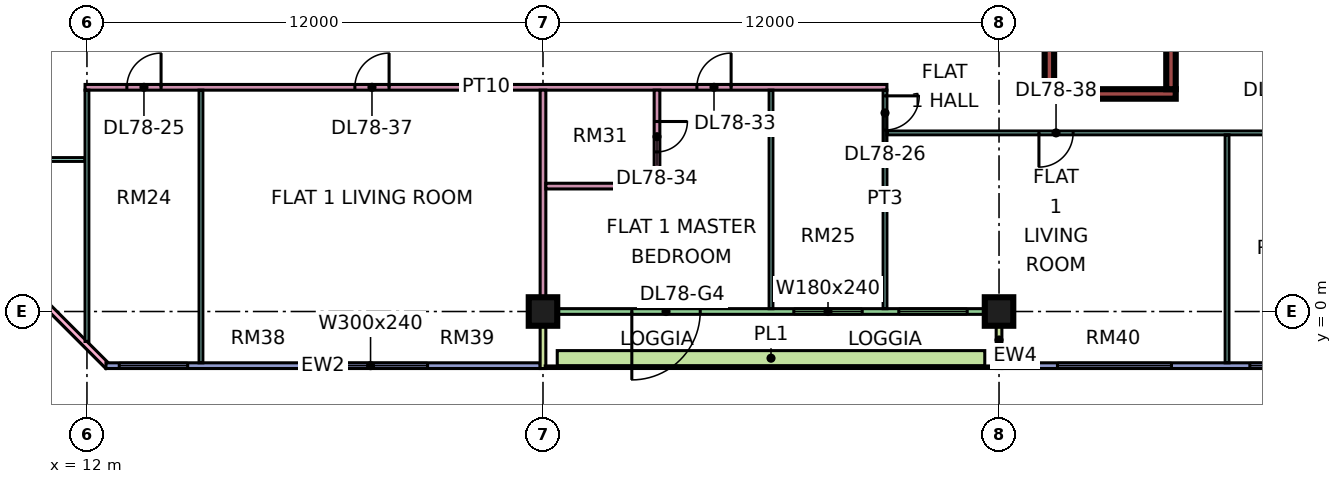
"""IFC4 building model, lengths in metres.
Left out: names, types, materials, properties, quantities, classifications, styles, units other than length and angle.
Written with IfcOpenShell. Run it as: python <this file> out.ifc"""

import sys

from ifc_helpers import new_model, si_unit, direction, frame, frame_2d, origin, origin_2d, place, context, subcontext, project, spatial, rectangle, extrude, element, fill, save


model = new_model("IFC4")
c1 = context("Model", 3, precision=1e-05, world=origin(), true_north=direction((0.0, 1.0)))
c2 = subcontext(c1, "Body", "Model", "MODEL_VIEW")
j1 = project(units=[si_unit("LENGTHUNIT", "METRE"), si_unit("PLANEANGLEUNIT", "RADIAN")], contexts=[c1])
p1 = place(None, origin())
s1 = spatial("IfcSite", under=j1, at=p1, CompositionType="ELEMENT")
p2 = place(p1, origin())
s2 = spatial("IfcBuilding", under=s1, at=p2, CompositionType="ELEMENT")
p3 = place(p2, frame((0.0, 0.0, 338.9)))
s3 = spatial("IfcBuildingStorey", under=s2, at=p3, CompositionType="ELEMENT", Elevation=338.9)
for number, where, z_axis, x_axis in (
    (1, (24.0, 0.0, 0.0), (0.0, 0.0, 1.0), (1.0, 0.0, 0.0)),
    (2, (36.0, 0.0, 0.0), (0.0, 0.0, 1.0), (1.0, 0.0, 0.0)),
):
    element("IfcColumn", number, at=place(p3, frame(where, z_axis=z_axis, x_axis=x_axis)), inside=s3, PredefinedType="COLUMN", context=c2, shape_type="SweptSolid", body=[
        extrude(rectangle(XDim=0.75, YDim=0.75, at=origin_2d()), origin(), (0.0, 0.0, 1.0), 3.75),
    ])
p4 = place(p3, frame((37.2, 5.725, 0.0), z_axis=(0.0, 0.0, 1.0), x_axis=(1.0, 0.0, 0.0)))
e3 = element("IfcWall", 3, at=p4, inside=s3, PredefinedType="SHEAR", context=c2, shape_type="SweptSolid", body=[
    extrude(rectangle(XDim=3.45, YDim=0.25, at=frame_2d((1.725, 0.0))), origin(), (0.0, 0.0, 1.0), 3.75),
])
for number, where, z_axis, x_axis in (
    (4, (37.325, 5.85, 0.0), (0.0, 0.0, 1.0), (0.0, 1.0, 0.0)),
    (5, (40.525, 5.85, 0.0), (0.0, 0.0, 1.0), (0.0, 1.0, 0.0)),
):
    element("IfcWall", number, at=place(p3, frame(where, z_axis=z_axis, x_axis=x_axis)), inside=s3, PredefinedType="SHEAR", context=c2, shape_type="SweptSolid", body=[
        extrude(rectangle(XDim=6.5, YDim=0.25, at=frame_2d((3.25, 0.0))), origin(), (0.0, 0.0, 1.0), 3.75),
    ])
p5 = place(p3, frame((-1.447, 12.553, 0.0), z_axis=(0.0, 0.0, 1.0), x_axis=(0.707106781187, -0.707106781187, 0.0)))
e6 = element("IfcWall", 6, at=p5, inside=s3, PredefinedType="SOLIDWALL", context=c2, shape_type="SweptSolid", body=[
    extrude(rectangle(XDim=19.799, YDim=0.15, at=frame_2d((9.899, 0.0))), origin(), (0.0, 0.0, 1.0), 3.35),
])
p6 = place(p5, frame((2.212, 0.0, 0.45)))
e7 = element("IfcOpeningElement", 7, at=p6, cuts=e6, PredefinedType="OPENING", context=c2, shape_type="SweptSolid", body=[
    extrude(rectangle(XDim=3.0, YDim=2.4, at=frame_2d((1.5, 1.2))), frame((0.0, 0.085, 0.0), z_axis=(0.0, -1.0, 0.0), x_axis=(1.0, 0.0, 0.0)), (0.0, 0.0, 1.0), 0.17),
])
p7 = place(p5, frame((10.216, 0.0, 0.45)))
e8 = element("IfcOpeningElement", 8, at=p7, cuts=e6, PredefinedType="OPENING", context=c2, shape_type="SweptSolid", body=[
    extrude(rectangle(XDim=3.0, YDim=2.4, at=frame_2d((1.5, 1.2))), frame((0.0, 0.085, 0.0), z_axis=(0.0, -1.0, 0.0), x_axis=(1.0, 0.0, 0.0)), (0.0, 0.0, 1.0), 0.17),
])
p8 = place(p3, frame((12.5, -1.425, 0.0), z_axis=(0.0, 0.0, 1.0), x_axis=(1.0, 0.0, 0.0)))
e9 = element("IfcWall", 9, at=p8, inside=s3, PredefinedType="SOLIDWALL", context=c2, shape_type="SweptSolid", body=[
    extrude(rectangle(XDim=11.425, YDim=0.15, at=frame_2d((5.712, 0.0))), origin(), (0.0, 0.0, 1.0), 3.35),
])
p9 = place(p8, frame((0.35, 0.0, 0.45)))
e10 = element("IfcOpeningElement", 10, at=p9, cuts=e9, PredefinedType="OPENING", context=c2, shape_type="SweptSolid", body=[
    extrude(rectangle(XDim=1.8, YDim=2.4, at=frame_2d((0.9, 1.2))), frame((0.0, 0.085, 0.0), z_axis=(0.0, -1.0, 0.0), x_axis=(1.0, 0.0, 0.0)), (0.0, 0.0, 1.0), 0.17),
])
p10 = place(p8, frame((5.462, 0.0, 0.45)))
e11 = element("IfcOpeningElement", 11, at=p10, cuts=e9, PredefinedType="OPENING", context=c2, shape_type="SweptSolid", body=[
    extrude(rectangle(XDim=3.0, YDim=2.4, at=frame_2d((1.5, 1.2))), frame((0.0, 0.085, 0.0), z_axis=(0.0, -1.0, 0.0), x_axis=(1.0, 0.0, 0.0)), (0.0, 0.0, 1.0), 0.17),
])
p11 = place(p3, frame((24.075, 0.0, 0.0), z_axis=(0.0, 0.0, 1.0), x_axis=(1.0, 0.0, 0.0)))
e12 = element("IfcWall", 12, at=p11, inside=s3, PredefinedType="SOLIDWALL", context=c2, shape_type="SweptSolid", body=[
    extrude(rectangle(XDim=11.85, YDim=0.15, at=frame_2d((5.925, 0.0))), origin(), (0.0, 0.0, 1.0), 3.35),
])
p12 = place(p11, frame((2.262, 0.0, 0.0)))
e13 = element("IfcOpeningElement", 13, at=p12, cuts=e12, PredefinedType="OPENING", context=c2, shape_type="SweptSolid", body=[
    extrude(rectangle(XDim=1.8, YDim=2.4, at=frame_2d((0.9, 1.2))), frame((0.0, 0.085, 0.0), z_axis=(0.0, -1.0, 0.0), x_axis=(1.0, 0.0, 0.0)), (0.0, 0.0, 1.0), 0.17),
])
p13 = place(p11, frame((6.525, 0.0, 0.45)))
e14 = element("IfcOpeningElement", 14, at=p13, cuts=e12, PredefinedType="OPENING", context=c2, shape_type="SweptSolid", body=[
    extrude(rectangle(XDim=1.8, YDim=2.4, at=frame_2d((0.9, 1.2))), frame((0.0, 0.085, 0.0), z_axis=(0.0, -1.0, 0.0), x_axis=(1.0, 0.0, 0.0)), (0.0, 0.0, 1.0), 0.17),
])
p14 = place(p11, frame((9.288, 0.0, 0.45)))
e15 = element("IfcOpeningElement", 15, at=p14, cuts=e12, PredefinedType="OPENING", context=c2, shape_type="SweptSolid", body=[
    extrude(rectangle(XDim=1.8, YDim=2.4, at=frame_2d((0.9, 1.2))), frame((0.0, 0.085, 0.0), z_axis=(0.0, -1.0, 0.0), x_axis=(1.0, 0.0, 0.0)), (0.0, 0.0, 1.0), 0.17),
])
for number, where, z_axis, x_axis in (
    (16, (24.0, -1.5, 0.0), (0.0, 0.0, 1.0), (0.0, 1.0, 0.0)),
    (17, (36.0, -1.5, 0.0), (0.0, 0.0, 1.0), (0.0, 1.0, 0.0)),
):
    element("IfcWall", number, at=place(p3, frame(where, z_axis=z_axis, x_axis=x_axis)), inside=s3, PredefinedType="SOLIDWALL", context=c2, shape_type="SweptSolid", body=[
        extrude(rectangle(XDim=1.5, YDim=0.15, at=frame_2d((0.75, 0.0))), origin(), (0.0, 0.0, 1.0), 3.35),
    ])
p15 = place(p3, frame((36.075, -1.425, 0.0), z_axis=(0.0, 0.0, 1.0), x_axis=(1.0, 0.0, 0.0)))
e18 = element("IfcWall", 18, at=p15, inside=s3, PredefinedType="SOLIDWALL", context=c2, shape_type="SweptSolid", body=[
    extrude(rectangle(XDim=11.85, YDim=0.15, at=frame_2d((5.925, 0.0))), origin(), (0.0, 0.0, 1.0), 3.35),
])
p16 = place(p15, frame((1.462, 0.0, 0.45)))
e19 = element("IfcOpeningElement", 19, at=p16, cuts=e18, PredefinedType="OPENING", context=c2, shape_type="SweptSolid", body=[
    extrude(rectangle(XDim=3.0, YDim=2.4, at=frame_2d((1.5, 1.2))), frame((0.0, 0.085, 0.0), z_axis=(0.0, -1.0, 0.0), x_axis=(1.0, 0.0, 0.0)), (0.0, 0.0, 1.0), 0.17),
])
p17 = place(p15, frame((6.525, 0.0, 0.45)))
e20 = element("IfcOpeningElement", 20, at=p17, cuts=e18, PredefinedType="OPENING", context=c2, shape_type="SweptSolid", body=[
    extrude(rectangle(XDim=1.8, YDim=2.4, at=frame_2d((0.9, 1.2))), frame((0.0, 0.085, 0.0), z_axis=(0.0, -1.0, 0.0), x_axis=(1.0, 0.0, 0.0)), (0.0, 0.0, 1.0), 0.17),
])
p18 = place(p15, frame((9.488, 0.0, 0.45)))
e21 = element("IfcOpeningElement", 21, at=p18, cuts=e18, PredefinedType="OPENING", context=c2, shape_type="SweptSolid", body=[
    extrude(rectangle(XDim=1.8, YDim=2.4, at=frame_2d((0.9, 1.2))), frame((0.0, 0.085, 0.0), z_axis=(0.0, -1.0, 0.0), x_axis=(1.0, 0.0, 0.0)), (0.0, 0.0, 1.0), 0.17),
])
p19 = place(p3, frame((24.375, -1.229, 0.0), z_axis=(0.0, 0.0, 1.0), x_axis=(1.0, 0.0, 0.0)))
e22 = element("IfcWall", 22, at=p19, inside=s3, PredefinedType="SOLIDWALL", context=c2, shape_type="SweptSolid", body=[
    extrude(rectangle(XDim=11.25, YDim=0.4, at=frame_2d((5.625, 0.0))), origin(), (0.0, 0.0, 1.0), 0.7),
])
p20 = place(p3, frame((9.05, 4.0, 0.0), z_axis=(0.0, 0.0, 1.0), x_axis=(1.0, 0.0, 0.0)))
e23 = element("IfcWall", 23, at=p20, inside=s3, PredefinedType="PARTITIONING", context=c2, shape_type="SweptSolid", body=[
    extrude(rectangle(XDim=2.9, YDim=0.1, at=frame_2d((1.45, 0.0))), origin(), (0.0, 0.0, 1.0), 3.35),
])
p21 = place(p3, frame((11.95, 5.9, 0.0), z_axis=(0.0, 0.0, 1.0), x_axis=(1.0, 0.0, 0.0)))
e24 = element("IfcWall", 24, at=p21, inside=s3, PredefinedType="PARTITIONING", context=c2, shape_type="SweptSolid", body=[
    extrude(rectangle(XDim=21.1, YDim=0.15, at=frame_2d((10.55, 0.0))), origin(), (0.0, 0.0, 1.0), 3.35),
])
p22 = place(p21, frame((1.1, 0.0, 0.0)))
e25 = element("IfcOpeningElement", 25, at=p22, cuts=e24, PredefinedType="OPENING", context=c2, shape_type="SweptSolid", body=[
    extrude(rectangle(XDim=0.9, YDim=2.1, at=frame_2d((0.45, 1.05))), frame((0.0, 0.085, 0.0), z_axis=(0.0, -1.0, 0.0), x_axis=(1.0, 0.0, 0.0)), (0.0, 0.0, 1.0), 0.17),
])
p23 = place(p21, frame((16.1, 0.0, 0.0)))
e26 = element("IfcOpeningElement", 26, at=p23, cuts=e24, PredefinedType="OPENING", context=c2, shape_type="SweptSolid", body=[
    extrude(rectangle(XDim=0.9, YDim=2.1, at=frame_2d((0.45, 1.05))), frame((0.0, 0.085, 0.0), z_axis=(0.0, -1.0, 0.0), x_axis=(1.0, 0.0, 0.0)), (0.0, 0.0, 1.0), 0.17),
])
p24 = place(p21, frame((7.1, 0.0, 0.0)))
e27 = element("IfcOpeningElement", 27, at=p24, cuts=e24, PredefinedType="OPENING", context=c2, shape_type="SweptSolid", body=[
    extrude(rectangle(XDim=0.9, YDim=2.1, at=frame_2d((0.45, 1.05))), frame((0.0, 0.085, 0.0), z_axis=(0.0, -1.0, 0.0), x_axis=(1.0, 0.0, 0.0)), (0.0, 0.0, 1.0), 0.17),
])
p25 = place(p3, frame((12.0, -0.788, 0.0), z_axis=(0.0, 0.0, 1.0), x_axis=(0.0, 1.0, 0.0)))
e28 = element("IfcWall", 28, at=p25, inside=s3, PredefinedType="PARTITIONING", context=c2, shape_type="SweptSolid", body=[
    extrude(rectangle(XDim=6.613, YDim=0.1, at=frame_2d((3.306, 0.0))), origin(), (0.0, 0.0, 1.0), 3.35),
])
p26 = place(p3, frame((15.0, -1.35, 0.0), z_axis=(0.0, 0.0, 1.0), x_axis=(0.0, 1.0, 0.0)))
e29 = element("IfcWall", 29, at=p26, inside=s3, PredefinedType="PARTITIONING", context=c2, shape_type="SweptSolid", body=[
    extrude(rectangle(XDim=7.175, YDim=0.1, at=frame_2d((3.587, 0.0))), origin(), (0.0, 0.0, 1.0), 3.35),
])
p27 = place(p3, frame((24.0, 0.0, 0.0), z_axis=(0.0, 0.0, 1.0), x_axis=(0.0, 1.0, 0.0)))
e30 = element("IfcWall", 30, at=p27, inside=s3, PredefinedType="PARTITIONING", context=c2, shape_type="SweptSolid", body=[
    extrude(rectangle(XDim=5.825, YDim=0.15, at=frame_2d((2.913, 0.0))), origin(), (0.0, 0.0, 1.0), 3.35),
])
p28 = place(p3, frame((24.075, 3.3, 0.0), z_axis=(0.0, 0.0, 1.0), x_axis=(1.0, 0.0, 0.0)))
e31 = element("IfcWall", 31, at=p28, inside=s3, PredefinedType="PARTITIONING", context=c2, shape_type="SweptSolid", body=[
    extrude(rectangle(XDim=3.0, YDim=0.15, at=frame_2d((1.5, 0.0))), origin(), (0.0, 0.0, 1.0), 3.35),
])
p29 = place(p3, frame((27.0, 3.375, 0.0), z_axis=(0.0, 0.0, 1.0), x_axis=(0.0, 1.0, 0.0)))
e32 = element("IfcWall", 32, at=p29, inside=s3, PredefinedType="PARTITIONING", context=c2, shape_type="SweptSolid", body=[
    extrude(rectangle(XDim=2.45, YDim=0.15, at=frame_2d((1.225, 0.0))), origin(), (0.0, 0.0, 1.0), 3.35),
])
p30 = place(p29, frame((0.825, 0.0, 0.0)))
e33 = element("IfcOpeningElement", 33, at=p30, cuts=e32, PredefinedType="OPENING", context=c2, shape_type="SweptSolid", body=[
    extrude(rectangle(XDim=0.8, YDim=2.1, at=frame_2d((0.4, 1.05))), frame((0.0, 0.085, 0.0), z_axis=(0.0, -1.0, 0.0), x_axis=(1.0, 0.0, 0.0)), (0.0, 0.0, 1.0), 0.17),
])
p31 = place(p3, frame((30.0, 0.074, 0.0), z_axis=(0.0, 0.0, 1.0), x_axis=(0.0, 1.0, 0.0)))
e34 = element("IfcWall", 34, at=p31, inside=s3, PredefinedType="PARTITIONING", context=c2, shape_type="SweptSolid", body=[
    extrude(rectangle(XDim=5.751, YDim=0.1, at=frame_2d((2.875, 0.0))), origin(), (0.0, 0.0, 1.0), 3.35),
])
p32 = place(p3, frame((33.0, 0.074, 0.0), z_axis=(0.0, 0.0, 1.0), x_axis=(0.0, 1.0, 0.0)))
e35 = element("IfcWall", 35, at=p32, inside=s3, PredefinedType="PARTITIONING", context=c2, shape_type="SweptSolid", body=[
    extrude(rectangle(XDim=5.751, YDim=0.1, at=frame_2d((2.875, 0.0))), origin(), (0.0, 0.0, 1.0), 3.35),
])
p33 = place(p32, frame((4.701, 0.0, 0.0)))
e36 = element("IfcOpeningElement", 36, at=p33, cuts=e35, PredefinedType="OPENING", context=c2, shape_type="SweptSolid", body=[
    extrude(rectangle(XDim=0.9, YDim=2.1, at=frame_2d((0.45, 1.05))), frame((0.0, 0.06, 0.0), z_axis=(0.0, -1.0, 0.0), x_axis=(1.0, 0.0, 0.0)), (0.0, 0.0, 1.0), 0.12),
])
p34 = place(p3, frame((33.05, 4.7, 0.0), z_axis=(0.0, 0.0, 1.0), x_axis=(1.0, 0.0, 0.0)))
e37 = element("IfcWall", 37, at=p34, inside=s3, PredefinedType="PARTITIONING", context=c2, shape_type="SweptSolid", body=[
    extrude(rectangle(XDim=20.876, YDim=0.1, at=frame_2d((10.438, 0.0))), origin(), (0.0, 0.0, 1.0), 3.35),
])
p35 = place(p34, frame((10.0, 0.0, 0.0)))
e38 = element("IfcOpeningElement", 38, at=p35, cuts=e37, PredefinedType="OPENING", context=c2, shape_type="SweptSolid", body=[
    extrude(rectangle(XDim=0.9, YDim=2.1, at=frame_2d((0.45, 1.05))), frame((0.0, 0.06, 0.0), z_axis=(0.0, -1.0, 0.0), x_axis=(1.0, 0.0, 0.0)), (0.0, 0.0, 1.0), 0.12),
])
p36 = place(p34, frame((13.0, 0.0, 0.0)))
e39 = element("IfcOpeningElement", 39, at=p36, cuts=e37, PredefinedType="OPENING", context=c2, shape_type="SweptSolid", body=[
    extrude(rectangle(XDim=0.9, YDim=2.1, at=frame_2d((0.45, 1.05))), frame((0.0, 0.06, 0.0), z_axis=(0.0, -1.0, 0.0), x_axis=(1.0, 0.0, 0.0)), (0.0, 0.0, 1.0), 0.12),
])
p37 = place(p34, frame((16.0, 0.0, 0.0)))
e40 = element("IfcOpeningElement", 40, at=p37, cuts=e37, PredefinedType="OPENING", context=c2, shape_type="SweptSolid", body=[
    extrude(rectangle(XDim=0.9, YDim=2.1, at=frame_2d((0.45, 1.05))), frame((0.0, 0.06, 0.0), z_axis=(0.0, -1.0, 0.0), x_axis=(1.0, 0.0, 0.0)), (0.0, 0.0, 1.0), 0.12),
])
p38 = place(p34, frame((19.0, 0.0, 0.0)))
e41 = element("IfcOpeningElement", 41, at=p38, cuts=e37, PredefinedType="OPENING", context=c2, shape_type="SweptSolid", body=[
    extrude(rectangle(XDim=0.9, YDim=2.1, at=frame_2d((0.45, 1.05))), frame((0.0, 0.06, 0.0), z_axis=(0.0, -1.0, 0.0), x_axis=(1.0, 0.0, 0.0)), (0.0, 0.0, 1.0), 0.12),
])
p39 = place(p34, frame((4.0, 0.0, 0.0)))
e42 = element("IfcOpeningElement", 42, at=p39, cuts=e37, PredefinedType="OPENING", context=c2, shape_type="SweptSolid", body=[
    extrude(rectangle(XDim=0.9, YDim=2.1, at=frame_2d((0.45, 1.05))), frame((0.0, 0.06, 0.0), z_axis=(0.0, -1.0, 0.0), x_axis=(1.0, 0.0, 0.0)), (0.0, 0.0, 1.0), 0.12),
])
p40 = place(p3, frame((42.0, -1.35, 0.0), z_axis=(0.0, 0.0, 1.0), x_axis=(0.0, 1.0, 0.0)))
e43 = element("IfcWall", 43, at=p40, inside=s3, PredefinedType="PARTITIONING", context=c2, shape_type="SweptSolid", body=[
    extrude(rectangle(XDim=6.0, YDim=0.1, at=frame_2d((3.0, 0.0))), origin(), (0.0, 0.0, 1.0), 3.35),
])
p41 = place(p9, origin())
e44 = element("IfcWindow", 44, at=p41, inside=s3, PartitioningType="SINGLE_PANEL", PredefinedType="WINDOW", context=c2, shape_type="SweptSolid", body=[
    extrude(rectangle(XDim=1.8, YDim=2.4, at=frame_2d((0.9, 1.2))), frame((0.0, 0.03, 0.0), z_axis=(0.0, -1.0, 0.0), x_axis=(1.0, 0.0, 0.0)), (0.0, 0.0, 1.0), 0.06),
])
fill(e10, e44)
p42 = place(p10, origin())
e45 = element("IfcWindow", 45, at=p42, inside=s3, PartitioningType="SINGLE_PANEL", PredefinedType="WINDOW", context=c2, shape_type="SweptSolid", body=[
    extrude(rectangle(XDim=3.0, YDim=2.4, at=frame_2d((1.5, 1.2))), frame((0.0, 0.03, 0.0), z_axis=(0.0, -1.0, 0.0), x_axis=(1.0, 0.0, 0.0)), (0.0, 0.0, 1.0), 0.06),
])
fill(e11, e45)
p43 = place(p12, frame((1.8, 0.0, 0.0), z_axis=(0.0, 0.0, 1.0), x_axis=(-1.0, 0.0, 0.0)))
e46 = element("IfcDoor", 46, at=p43, inside=s3, OperationType="DOUBLE_DOOR_SINGLE_SWING", PredefinedType="DOOR", context=c2, shape_type="SweptSolid", body=[
    extrude(rectangle(XDim=1.8, YDim=2.4, at=frame_2d((0.9, 1.2))), frame((0.0, 0.025, 0.0), z_axis=(0.0, -1.0, 0.0), x_axis=(1.0, 0.0, 0.0)), (0.0, 0.0, 1.0), 0.05),
])
fill(e13, e46)
p44 = place(p13, origin())
e47 = element("IfcWindow", 47, at=p44, inside=s3, PartitioningType="SINGLE_PANEL", PredefinedType="WINDOW", context=c2, shape_type="SweptSolid", body=[
    extrude(rectangle(XDim=1.8, YDim=2.4, at=frame_2d((0.9, 1.2))), frame((0.0, 0.03, 0.0), z_axis=(0.0, -1.0, 0.0), x_axis=(1.0, 0.0, 0.0)), (0.0, 0.0, 1.0), 0.06),
])
fill(e14, e47)
p45 = place(p14, origin())
e48 = element("IfcWindow", 48, at=p45, inside=s3, PartitioningType="SINGLE_PANEL", PredefinedType="WINDOW", context=c2, shape_type="SweptSolid", body=[
    extrude(rectangle(XDim=1.8, YDim=2.4, at=frame_2d((0.9, 1.2))), frame((0.0, 0.03, 0.0), z_axis=(0.0, -1.0, 0.0), x_axis=(1.0, 0.0, 0.0)), (0.0, 0.0, 1.0), 0.06),
])
fill(e15, e48)
p46 = place(p16, origin())
e49 = element("IfcWindow", 49, at=p46, inside=s3, PartitioningType="SINGLE_PANEL", PredefinedType="WINDOW", context=c2, shape_type="SweptSolid", body=[
    extrude(rectangle(XDim=3.0, YDim=2.4, at=frame_2d((1.5, 1.2))), frame((0.0, 0.03, 0.0), z_axis=(0.0, -1.0, 0.0), x_axis=(1.0, 0.0, 0.0)), (0.0, 0.0, 1.0), 0.06),
])
fill(e19, e49)
p47 = place(p17, origin())
e50 = element("IfcWindow", 50, at=p47, inside=s3, PartitioningType="SINGLE_PANEL", PredefinedType="WINDOW", context=c2, shape_type="SweptSolid", body=[
    extrude(rectangle(XDim=1.8, YDim=2.4, at=frame_2d((0.9, 1.2))), frame((0.0, 0.03, 0.0), z_axis=(0.0, -1.0, 0.0), x_axis=(1.0, 0.0, 0.0)), (0.0, 0.0, 1.0), 0.06),
])
fill(e20, e50)
p48 = place(p22, frame((0.9, 0.0, 0.0), z_axis=(0.0, 0.0, 1.0), x_axis=(-1.0, 0.0, 0.0)))
e51 = element("IfcDoor", 51, at=p48, inside=s3, OperationType="SINGLE_SWING_RIGHT", PredefinedType="DOOR", context=c2, shape_type="SweptSolid", body=[
    extrude(rectangle(XDim=0.9, YDim=2.1, at=frame_2d((0.45, 1.05))), frame((0.0, 0.025, 0.0), z_axis=(0.0, -1.0, 0.0), x_axis=(1.0, 0.0, 0.0)), (0.0, 0.0, 1.0), 0.05),
])
fill(e25, e51)
p49 = place(p33, origin())
e52 = element("IfcDoor", 52, at=p49, inside=s3, OperationType="SINGLE_SWING_RIGHT", PredefinedType="DOOR", context=c2, shape_type="SweptSolid", body=[
    extrude(rectangle(XDim=0.9, YDim=2.1, at=frame_2d((0.45, 1.05))), frame((0.0, 0.025, 0.0), z_axis=(0.0, -1.0, 0.0), x_axis=(1.0, 0.0, 0.0)), (0.0, 0.0, 1.0), 0.05),
])
fill(e36, e52)
p50 = place(p23, frame((0.9, 0.0, 0.0), z_axis=(0.0, 0.0, 1.0), x_axis=(-1.0, 0.0, 0.0)))
e53 = element("IfcDoor", 53, at=p50, inside=s3, OperationType="SINGLE_SWING_RIGHT", PredefinedType="DOOR", context=c2, shape_type="SweptSolid", body=[
    extrude(rectangle(XDim=0.9, YDim=2.1, at=frame_2d((0.45, 1.05))), frame((0.0, 0.025, 0.0), z_axis=(0.0, -1.0, 0.0), x_axis=(1.0, 0.0, 0.0)), (0.0, 0.0, 1.0), 0.05),
])
fill(e26, e53)
p51 = place(p30, origin())
e54 = element("IfcDoor", 54, at=p51, inside=s3, OperationType="SINGLE_SWING_RIGHT", PredefinedType="DOOR", context=c2, shape_type="SweptSolid", body=[
    extrude(rectangle(XDim=0.8, YDim=2.1, at=frame_2d((0.4, 1.05))), frame((0.0, 0.025, 0.0), z_axis=(0.0, -1.0, 0.0), x_axis=(1.0, 0.0, 0.0)), (0.0, 0.0, 1.0), 0.05),
])
fill(e33, e54)
p52 = place(p24, frame((0.9, 0.0, 0.0), z_axis=(0.0, 0.0, 1.0), x_axis=(-1.0, 0.0, 0.0)))
e55 = element("IfcDoor", 55, at=p52, inside=s3, OperationType="SINGLE_SWING_RIGHT", PredefinedType="DOOR", context=c2, shape_type="SweptSolid", body=[
    extrude(rectangle(XDim=0.9, YDim=2.1, at=frame_2d((0.45, 1.05))), frame((0.0, 0.025, 0.0), z_axis=(0.0, -1.0, 0.0), x_axis=(1.0, 0.0, 0.0)), (0.0, 0.0, 1.0), 0.05),
])
fill(e27, e55)
p53 = place(p39, frame((0.9, 0.0, 0.0), z_axis=(0.0, 0.0, 1.0), x_axis=(-1.0, 0.0, 0.0)))
e56 = element("IfcDoor", 56, at=p53, inside=s3, OperationType="SINGLE_SWING_LEFT", PredefinedType="DOOR", context=c2, shape_type="SweptSolid", body=[
    extrude(rectangle(XDim=0.9, YDim=2.1, at=frame_2d((0.45, 1.05))), frame((0.0, 0.025, 0.0), z_axis=(0.0, -1.0, 0.0), x_axis=(1.0, 0.0, 0.0)), (0.0, 0.0, 1.0), 0.05),
])
fill(e42, e56)
save(model, sys.argv[1])
